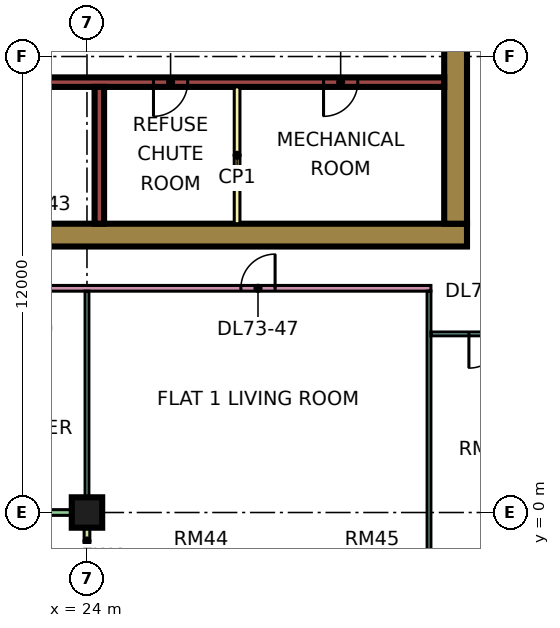
"""IFC4 building model, lengths in metres.
Left out: names, types, materials, properties, quantities, classifications, styles, units other than length and angle.
Written with IfcOpenShell. Run it as: python <this file> out.ifc"""

import sys

from ifc_helpers import new_model, si_unit, direction, frame, frame_2d, origin, origin_2d, place, context, subcontext, project, spatial, rectangle, extrude, element, fill, save


model = new_model("IFC4")
c1 = context("Model", 3, precision=1e-05, world=origin(), true_north=direction((0.0, 1.0)))
c2 = subcontext(c1, "Body", "Model", "MODEL_VIEW")
j1 = project(units=[si_unit("LENGTHUNIT", "METRE"), si_unit("PLANEANGLEUNIT", "RADIAN")], contexts=[c1])
p1 = place(None, origin())
s1 = spatial("IfcSite", under=j1, at=p1, CompositionType="ELEMENT")
p2 = place(p1, origin())
s2 = spatial("IfcBuilding", under=s1, at=p2, CompositionType="ELEMENT")
p3 = place(p2, frame((0.0, 0.0, 310.9)))
s3 = spatial("IfcBuildingStorey", under=s2, at=p3, CompositionType="ELEMENT", Elevation=310.9)
p4 = place(p3, frame((24.0, 0.0, 0.0), z_axis=(0.0, 0.0, 1.0), x_axis=(1.0, 0.0, 0.0)))
e1 = element("IfcColumn", 1, at=p4, inside=s3, PredefinedType="COLUMN", context=c2, shape_type="SweptSolid", body=[
    extrude(rectangle(XDim=0.8, YDim=0.8, at=origin_2d()), origin(), (0.0, 0.0, 1.0), 3.75),
])
p5 = place(p3, frame((9.0, 7.3, 0.0), z_axis=(0.0, 0.0, 1.0), x_axis=(1.0, 0.0, 0.0)))
e2 = element("IfcWall", 2, at=p5, inside=s3, PredefinedType="SHEAR", context=c2, shape_type="SweptSolid", body=[
    extrude(rectangle(XDim=25.0, YDim=0.6, at=frame_2d((12.5, 0.0))), origin(), (0.0, 0.0, 1.0), 3.75),
])
p6 = place(p3, frame((33.7, 7.6, 0.0), z_axis=(0.0, 0.0, 1.0), x_axis=(0.0, 1.0, 0.0)))
e3 = element("IfcWall", 3, at=p6, inside=s3, PredefinedType="SHEAR", context=c2, shape_type="SweptSolid", body=[
    extrude(rectangle(XDim=11.8, YDim=0.6, at=frame_2d((5.9, 0.0))), origin(), (0.0, 0.0, 1.0), 3.75),
])
p7 = place(p6, frame((5.6, 0.0, 0.0)))
e4 = element("IfcOpeningElement", 4, at=p7, cuts=e3, PredefinedType="OPENING", context=c2, shape_type="SweptSolid", body=[
    extrude(rectangle(XDim=1.8, YDim=2.4, at=frame_2d((0.9, 1.2))), frame((0.0, 0.31, 0.0), z_axis=(0.0, -1.0, 0.0), x_axis=(1.0, 0.0, 0.0)), (0.0, 0.0, 1.0), 0.62),
])
p8 = place(p3, frame((13.45, 11.325, 0.0), z_axis=(0.0, 0.0, 1.0), x_axis=(1.0, 0.0, 0.0)))
e5 = element("IfcWall", 5, at=p8, inside=s3, PredefinedType="SHEAR", context=c2, shape_type="SweptSolid", body=[
    extrude(rectangle(XDim=19.95, YDim=0.25, at=frame_2d((9.975, 0.0))), origin(), (0.0, 0.0, 1.0), 3.75),
])
p9 = place(p8, frame((4.925, 0.0, 0.0)))
e6 = element("IfcOpeningElement", 6, at=p9, cuts=e5, PredefinedType="OPENING", context=c2, shape_type="SweptSolid", body=[
    extrude(rectangle(XDim=0.9, YDim=2.1, at=frame_2d((0.45, 1.05))), frame((0.0, 0.135, 0.0), z_axis=(0.0, -1.0, 0.0), x_axis=(1.0, 0.0, 0.0)), (0.0, 0.0, 1.0), 0.27),
])
p10 = place(p8, frame((12.3, 0.0, 0.0)))
e7 = element("IfcOpeningElement", 7, at=p10, cuts=e5, PredefinedType="OPENING", context=c2, shape_type="SweptSolid", body=[
    extrude(rectangle(XDim=0.9, YDim=2.1, at=frame_2d((0.45, 1.05))), frame((0.0, 0.135, 0.0), z_axis=(0.0, -1.0, 0.0), x_axis=(1.0, 0.0, 0.0)), (0.0, 0.0, 1.0), 0.27),
])
p11 = place(p8, frame((16.775, 0.0, 0.0)))
e8 = element("IfcOpeningElement", 8, at=p11, cuts=e5, PredefinedType="OPENING", context=c2, shape_type="SweptSolid", body=[
    extrude(rectangle(XDim=0.9, YDim=2.1, at=frame_2d((0.45, 1.05))), frame((0.0, 0.135, 0.0), z_axis=(0.0, -1.0, 0.0), x_axis=(1.0, 0.0, 0.0)), (0.0, 0.0, 1.0), 0.27),
])
p12 = place(p3, frame((24.325, 7.6, 0.0), z_axis=(0.0, 0.0, 1.0), x_axis=(0.0, 1.0, 0.0)))
e9 = element("IfcWall", 9, at=p12, inside=s3, PredefinedType="SHEAR", context=c2, shape_type="SweptSolid", body=[
    extrude(rectangle(XDim=3.6, YDim=0.25, at=frame_2d((1.8, 0.0))), origin(), (0.0, 0.0, 1.0), 3.75),
])
p13 = place(p3, frame((12.575, 0.0, 0.0), z_axis=(0.0, 0.0, 1.0), x_axis=(1.0, 0.0, 0.0)))
e10 = element("IfcWall", 10, at=p13, inside=s3, PredefinedType="SOLIDWALL", context=c2, shape_type="SweptSolid", body=[
    extrude(rectangle(XDim=11.35, YDim=0.15, at=frame_2d((5.675, 0.0))), origin(), (0.0, 0.0, 1.0), 3.35),
])
p14 = place(p13, frame((0.613, 0.0, 0.0)))
e11 = element("IfcOpeningElement", 11, at=p14, cuts=e10, PredefinedType="OPENING", context=c2, shape_type="SweptSolid", body=[
    extrude(rectangle(XDim=1.2, YDim=2.4, at=frame_2d((0.6, 1.2))), frame((0.0, 0.085, 0.0), z_axis=(0.0, -1.0, 0.0), x_axis=(1.0, 0.0, 0.0)), (0.0, 0.0, 1.0), 0.17),
])
p15 = place(p13, frame((3.025, 0.0, 0.45)))
e12 = element("IfcOpeningElement", 12, at=p15, cuts=e10, PredefinedType="OPENING", context=c2, shape_type="SweptSolid", body=[
    extrude(rectangle(XDim=1.8, YDim=2.4, at=frame_2d((0.9, 1.2))), frame((0.0, 0.085, 0.0), z_axis=(0.0, -1.0, 0.0), x_axis=(1.0, 0.0, 0.0)), (0.0, 0.0, 1.0), 0.17),
])
p16 = place(p13, frame((6.675, 0.0, 0.45)))
e13 = element("IfcOpeningElement", 13, at=p16, cuts=e10, PredefinedType="OPENING", context=c2, shape_type="SweptSolid", body=[
    extrude(rectangle(XDim=3.0, YDim=2.4, at=frame_2d((1.5, 1.2))), frame((0.0, 0.085, 0.0), z_axis=(0.0, -1.0, 0.0), x_axis=(1.0, 0.0, 0.0)), (0.0, 0.0, 1.0), 0.17),
])
p17 = place(p3, frame((24.0, -1.5, 0.0), z_axis=(0.0, 0.0, 1.0), x_axis=(0.0, 1.0, 0.0)))
e14 = element("IfcWall", 14, at=p17, inside=s3, PredefinedType="SOLIDWALL", context=c2, shape_type="SweptSolid", body=[
    extrude(rectangle(XDim=1.5, YDim=0.15, at=frame_2d((0.75, 0.0))), origin(), (0.0, 0.0, 1.0), 3.35),
])
p18 = place(p3, frame((27.95, 7.6, 0.0), z_axis=(0.0, 0.0, 1.0), x_axis=(0.0, 1.0, 0.0)))
e15 = element("IfcWall", 15, at=p18, inside=s3, PredefinedType="PARTITIONING", context=c2, shape_type="SweptSolid", body=[
    extrude(rectangle(XDim=3.6, YDim=0.15, at=frame_2d((1.8, 0.0))), origin(), (0.0, 0.0, 1.0), 3.35),
])
p19 = place(p3, frame((11.95, 5.9, 0.0), z_axis=(0.0, 0.0, 1.0), x_axis=(1.0, 0.0, 0.0)))
e16 = element("IfcWall", 16, at=p19, inside=s3, PredefinedType="PARTITIONING", context=c2, shape_type="SweptSolid", body=[
    extrude(rectangle(XDim=21.1, YDim=0.15, at=frame_2d((10.55, 0.0))), origin(), (0.0, 0.0, 1.0), 3.35),
])
p20 = place(p19, frame((1.1, 0.0, 0.0)))
e17 = element("IfcOpeningElement", 17, at=p20, cuts=e16, PredefinedType="OPENING", context=c2, shape_type="SweptSolid", body=[
    extrude(rectangle(XDim=0.9, YDim=2.1, at=frame_2d((0.45, 1.05))), frame((0.0, 0.085, 0.0), z_axis=(0.0, -1.0, 0.0), x_axis=(1.0, 0.0, 0.0)), (0.0, 0.0, 1.0), 0.17),
])
p21 = place(p19, frame((4.1, 0.0, 0.0)))
e18 = element("IfcOpeningElement", 18, at=p21, cuts=e16, PredefinedType="OPENING", context=c2, shape_type="SweptSolid", body=[
    extrude(rectangle(XDim=0.9, YDim=2.1, at=frame_2d((0.45, 1.05))), frame((0.0, 0.085, 0.0), z_axis=(0.0, -1.0, 0.0), x_axis=(1.0, 0.0, 0.0)), (0.0, 0.0, 1.0), 0.17),
])
p22 = place(p19, frame((10.1, 0.0, 0.0)))
e19 = element("IfcOpeningElement", 19, at=p22, cuts=e16, PredefinedType="OPENING", context=c2, shape_type="SweptSolid", body=[
    extrude(rectangle(XDim=0.9, YDim=2.1, at=frame_2d((0.45, 1.05))), frame((0.0, 0.085, 0.0), z_axis=(0.0, -1.0, 0.0), x_axis=(1.0, 0.0, 0.0)), (0.0, 0.0, 1.0), 0.17),
])
p23 = place(p19, frame((16.1, 0.0, 0.0)))
e20 = element("IfcOpeningElement", 20, at=p23, cuts=e16, PredefinedType="OPENING", context=c2, shape_type="SweptSolid", body=[
    extrude(rectangle(XDim=0.9, YDim=2.1, at=frame_2d((0.45, 1.05))), frame((0.0, 0.085, 0.0), z_axis=(0.0, -1.0, 0.0), x_axis=(1.0, 0.0, 0.0)), (0.0, 0.0, 1.0), 0.17),
])
p24 = place(p3, frame((24.0, 0.0, 0.0), z_axis=(0.0, 0.0, 1.0), x_axis=(0.0, 1.0, 0.0)))
e21 = element("IfcWall", 21, at=p24, inside=s3, PredefinedType="PARTITIONING", context=c2, shape_type="SweptSolid", body=[
    extrude(rectangle(XDim=5.825, YDim=0.1, at=frame_2d((2.913, 0.0))), origin(), (0.0, 0.0, 1.0), 3.35),
])
p25 = place(p3, frame((33.0, -1.35, 0.0), z_axis=(0.0, 0.0, 1.0), x_axis=(0.0, 1.0, 0.0)))
e22 = element("IfcWall", 22, at=p25, inside=s3, PredefinedType="PARTITIONING", context=c2, shape_type="SweptSolid", body=[
    extrude(rectangle(XDim=7.175, YDim=0.1, at=frame_2d((3.587, 0.0))), origin(), (0.0, 0.0, 1.0), 3.35),
])
p26 = place(p3, frame((33.05, 4.7, 0.0), z_axis=(0.0, 0.0, 1.0), x_axis=(1.0, 0.0, 0.0)))
e23 = element("IfcWall", 23, at=p26, inside=s3, PredefinedType="PARTITIONING", context=c2, shape_type="SweptSolid", body=[
    extrude(rectangle(XDim=20.85, YDim=0.1, at=frame_2d((10.425, 0.0))), origin(), (0.0, 0.0, 1.0), 3.35),
])
p27 = place(p26, frame((1.0, 0.0, 0.0)))
e24 = element("IfcOpeningElement", 24, at=p27, cuts=e23, PredefinedType="OPENING", context=c2, shape_type="SweptSolid", body=[
    extrude(rectangle(XDim=0.9, YDim=2.1, at=frame_2d((0.45, 1.05))), frame((0.0, 0.06, 0.0), z_axis=(0.0, -1.0, 0.0), x_axis=(1.0, 0.0, 0.0)), (0.0, 0.0, 1.0), 0.12),
])
p28 = place(p26, frame((4.0, 0.0, 0.0)))
e25 = element("IfcOpeningElement", 25, at=p28, cuts=e23, PredefinedType="OPENING", context=c2, shape_type="SweptSolid", body=[
    extrude(rectangle(XDim=0.9, YDim=2.1, at=frame_2d((0.45, 1.05))), frame((0.0, 0.06, 0.0), z_axis=(0.0, -1.0, 0.0), x_axis=(1.0, 0.0, 0.0)), (0.0, 0.0, 1.0), 0.12),
])
p29 = place(p26, frame((16.0, 0.0, 0.0)))
e26 = element("IfcOpeningElement", 26, at=p29, cuts=e23, PredefinedType="OPENING", context=c2, shape_type="SweptSolid", body=[
    extrude(rectangle(XDim=0.9, YDim=2.1, at=frame_2d((0.45, 1.05))), frame((0.0, 0.06, 0.0), z_axis=(0.0, -1.0, 0.0), x_axis=(1.0, 0.0, 0.0)), (0.0, 0.0, 1.0), 0.12),
])
p30 = place(p26, frame((19.0, 0.0, 0.0)))
e27 = element("IfcOpeningElement", 27, at=p30, cuts=e23, PredefinedType="OPENING", context=c2, shape_type="SweptSolid", body=[
    extrude(rectangle(XDim=0.9, YDim=2.1, at=frame_2d((0.45, 1.05))), frame((0.0, 0.06, 0.0), z_axis=(0.0, -1.0, 0.0), x_axis=(1.0, 0.0, 0.0)), (0.0, 0.0, 1.0), 0.12),
])
p31 = place(p26, frame((10.0, 0.0, 0.0)))
e28 = element("IfcOpeningElement", 28, at=p31, cuts=e23, PredefinedType="OPENING", context=c2, shape_type="SweptSolid", body=[
    extrude(rectangle(XDim=0.9, YDim=2.1, at=frame_2d((0.45, 1.05))), frame((0.0, 0.06, 0.0), z_axis=(0.0, -1.0, 0.0), x_axis=(1.0, 0.0, 0.0)), (0.0, 0.0, 1.0), 0.12),
])
p32 = place(p10, frame((0.9, 0.0, 0.0), z_axis=(0.0, 0.0, 1.0), x_axis=(-1.0, 0.0, 0.0)))
e29 = element("IfcDoor", 29, at=p32, inside=s3, OperationType="SINGLE_SWING_LEFT", PredefinedType="DOOR", context=c2, shape_type="SweptSolid", body=[
    extrude(rectangle(XDim=0.9, YDim=2.1, at=frame_2d((0.45, 1.05))), frame((0.0, 0.025, 0.0), z_axis=(0.0, -1.0, 0.0), x_axis=(1.0, 0.0, 0.0)), (0.0, 0.0, 1.0), 0.05),
])
fill(e7, e29)
p33 = place(p11, frame((0.9, 0.0, 0.0), z_axis=(0.0, 0.0, 1.0), x_axis=(-1.0, 0.0, 0.0)))
e30 = element("IfcDoor", 30, at=p33, inside=s3, OperationType="SINGLE_SWING_LEFT", PredefinedType="DOOR", context=c2, shape_type="SweptSolid", body=[
    extrude(rectangle(XDim=0.9, YDim=2.1, at=frame_2d((0.45, 1.05))), frame((0.0, 0.025, 0.0), z_axis=(0.0, -1.0, 0.0), x_axis=(1.0, 0.0, 0.0)), (0.0, 0.0, 1.0), 0.05),
])
fill(e8, e30)
p34 = place(p27, frame((0.9, 0.0, 0.0), z_axis=(0.0, 0.0, 1.0), x_axis=(-1.0, 0.0, 0.0)))
e31 = element("IfcDoor", 31, at=p34, inside=s3, OperationType="SINGLE_SWING_LEFT", PredefinedType="DOOR", context=c2, shape_type="SweptSolid", body=[
    extrude(rectangle(XDim=0.9, YDim=2.1, at=frame_2d((0.45, 1.05))), frame((0.0, 0.025, 0.0), z_axis=(0.0, -1.0, 0.0), x_axis=(1.0, 0.0, 0.0)), (0.0, 0.0, 1.0), 0.05),
])
fill(e24, e31)
p35 = place(p23, frame((0.9, 0.0, 0.0), z_axis=(0.0, 0.0, 1.0), x_axis=(-1.0, 0.0, 0.0)))
e32 = element("IfcDoor", 32, at=p35, inside=s3, OperationType="SINGLE_SWING_RIGHT", PredefinedType="DOOR", context=c2, shape_type="SweptSolid", body=[
    extrude(rectangle(XDim=0.9, YDim=2.1, at=frame_2d((0.45, 1.05))), frame((0.0, 0.025, 0.0), z_axis=(0.0, -1.0, 0.0), x_axis=(1.0, 0.0, 0.0)), (0.0, 0.0, 1.0), 0.05),
])
fill(e20, e32)
save(model, sys.argv[1])
